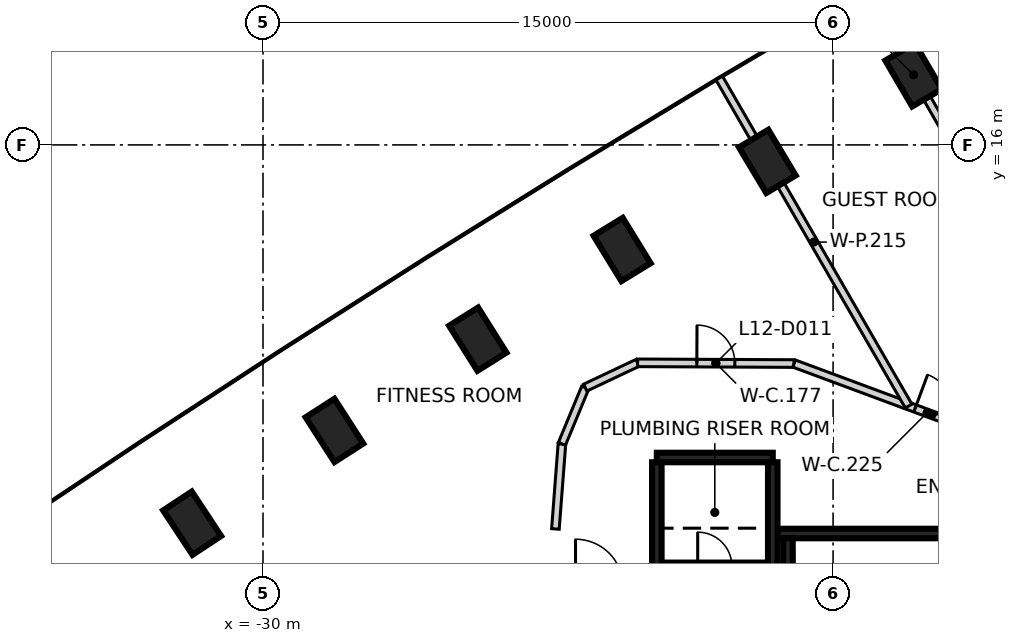
"""IFC4 building model, lengths in metres.
Left out: names, types, materials, properties, quantities, classifications, styles, units other than length and angle.
Written with IfcOpenShell. Run it as: python <this file> out.ifc"""

import sys

from ifc_helpers import new_model, si_unit, direction, frame, frame_2d, origin, origin_2d, place, context, subcontext, project, spatial, rectangle, extrude, element, fill, save


model = new_model("IFC4")
c1 = context("Model", 3, precision=1e-05, world=origin(), true_north=direction((0.0, 1.0)))
c2 = subcontext(c1, "Body", "Model", "MODEL_VIEW")
j1 = project(units=[si_unit("LENGTHUNIT", "METRE"), si_unit("PLANEANGLEUNIT", "RADIAN")], contexts=[c1])
p1 = place(None, origin())
s1 = spatial("IfcSite", under=j1, at=p1, CompositionType="ELEMENT")
p2 = place(p1, origin())
s2 = spatial("IfcBuilding", under=s1, at=p2, CompositionType="ELEMENT")
p3 = place(p2, frame((0.0, 0.0, 56.6)))
s3 = spatial("IfcBuildingStorey", under=s2, at=p3, CompositionType="ELEMENT", Elevation=56.6)
for number, where, z_axis, x_axis in (
    (1, (-12.883, 17.844, -0.475), (0.0, 0.0, 1.0), (-0.505, 0.863, 0.0)),
    (2, (-16.73, 15.566, -0.475), (0.0, 0.0, 1.0), (-0.514, 0.858, 0.0)),
    (3, (-20.552, 13.248, -0.475), (0.0, 0.0, 1.0), (-0.523, 0.852, 0.0)),
    (4, (-24.349, 10.888, -0.475), (0.0, 0.0, 1.0), (-0.532, 0.846, 0.0)),
    (5, (-28.12, 8.488, -0.475), (0.0, 0.0, 1.0), (-0.541, 0.841, 0.0)),
    (6, (-31.865, 6.046, -0.475), (0.0, 0.0, 1.0), (-0.551, 0.835, 0.0)),
):
    element("IfcColumn", number, at=place(p3, frame(where, z_axis=z_axis, x_axis=x_axis)), inside=s3, PredefinedType="COLUMN", context=c2, shape_type="SweptSolid", body=[
        extrude(rectangle(XDim=1.4, YDim=0.9, at=origin_2d()), origin(), (0.0, 0.0, 1.0), 3.6),
    ])
p4 = place(p3, frame((-16.472, 5.775, 0.0), z_axis=(0.0, 0.0, 1.0), x_axis=(1.0, 0.0, 0.0)))
e7 = element("IfcWall", 7, at=p4, inside=s3, PredefinedType="SHEAR", context=c2, shape_type="SweptSolid", body=[
    extrude(rectangle(XDim=5.51, YDim=0.25, at=frame_2d((2.755, 0.0))), origin(), (0.0, 0.0, 1.0), 3.125),
])
p5 = place(p3, frame((-19.637, 7.775, 0.0), z_axis=(0.0, 0.0, 1.0), x_axis=(1.0, 0.0, 0.0)))
e8 = element("IfcWall", 8, at=p5, inside=s3, PredefinedType="SHEAR", context=c2, shape_type="SweptSolid", body=[
    extrude(rectangle(XDim=3.05, YDim=0.25, at=frame_2d((1.525, 0.0))), origin(), (0.0, 0.0, 1.0), 3.125),
])
for number, where, z_axis, x_axis in (
    (9, (-16.587, 7.65, 0.0), (0.0, 0.0, 1.0), (0.0, -1.0, 0.0)),
    (10, (-19.637, 4.785, 0.0), (0.0, 0.0, 1.0), (0.0, 1.0, 0.0)),
):
    element("IfcWall", number, at=place(p3, frame(where, z_axis=z_axis, x_axis=x_axis)), inside=s3, PredefinedType="SHEAR", context=c2, shape_type="SweptSolid", body=[
        extrude(rectangle(XDim=2.865, YDim=0.25, at=frame_2d((1.432, 0.0))), origin(), (0.0, 0.0, 1.0), 3.125),
    ])
p6 = place(p3, frame((-16.187, 3.2, 0.0), z_axis=(0.0, 0.0, 1.0), x_axis=(0.0, 1.0, 0.0)))
e11 = element("IfcWall", 11, at=p6, inside=s3, PredefinedType="SHEAR", context=c2, shape_type="SweptSolid", body=[
    extrude(rectangle(XDim=2.449, YDim=0.25, at=frame_2d((1.225, 0.0))), origin(), (0.0, 0.0, 1.0), 3.125),
])
p7 = place(p3, frame((-22.306, 5.895, 0.0), z_axis=(0.0, 0.0, 1.0), x_axis=(0.076246699626, 0.997088983389, 0.0)))
e12 = element("IfcWall", 12, at=p7, inside=s3, PredefinedType="PARTITIONING", context=c2, shape_type="SweptSolid", body=[
    extrude(rectangle(XDim=2.241, YDim=0.2, at=frame_2d((1.121, 0.0))), origin(), (0.0, 0.0, 1.0), 3.125),
])
p8 = place(p3, frame((-22.135, 8.134, 0.0), z_axis=(0.0, 0.0, 1.0), x_axis=(0.383208453534, 0.923661886807, 0.0)))
e13 = element("IfcWall", 13, at=p8, inside=s3, PredefinedType="PARTITIONING", context=c2, shape_type="SweptSolid", body=[
    extrude(rectangle(XDim=1.602, YDim=0.2, at=frame_2d((0.801, 0.0))), origin(), (0.0, 0.0, 1.0), 3.125),
])
p9 = place(p3, frame((-21.521, 9.614, 0.0), z_axis=(0.0, 0.0, 1.0), x_axis=(0.904083527367, 0.427355795028, 0.0)))
e14 = element("IfcWall", 14, at=p9, inside=s3, PredefinedType="PARTITIONING", context=c2, shape_type="SweptSolid", body=[
    extrude(rectangle(XDim=1.523, YDim=0.2, at=frame_2d((0.761, 0.0))), origin(), (0.0, 0.0, 1.0), 3.125),
])
p10 = place(p3, frame((-20.143, 10.266, 0.0), z_axis=(0.0, 0.0, 1.0), x_axis=(0.999989297417, -0.004626559416, 0.0)))
e15 = element("IfcWall", 15, at=p10, inside=s3, PredefinedType="PARTITIONING", context=c2, shape_type="SweptSolid", body=[
    extrude(rectangle(XDim=4.116, YDim=0.2, at=frame_2d((2.058, 0.0))), origin(), (0.0, 0.0, 1.0), 3.125),
])
p11 = place(p10, frame((1.558, 0.0, 0.0)))
e16 = element("IfcOpeningElement", 16, at=p11, cuts=e15, PredefinedType="OPENING", context=c2, shape_type="SweptSolid", body=[
    extrude(rectangle(XDim=1.0, YDim=2.1, at=frame_2d((0.5, 1.05))), frame((0.0, 0.11, 0.0), z_axis=(0.0, -1.0, 0.0), x_axis=(1.0, 0.0, 0.0)), (0.0, 0.0, 1.0), 0.22),
])
p12 = place(p3, frame((-16.026, 10.247, 0.0), z_axis=(0.0, 0.0, 1.0), x_axis=(0.937540909117, -0.347875040397, 0.0)))
e17 = element("IfcWall", 17, at=p12, inside=s3, PredefinedType="PARTITIONING", context=c2, shape_type="SweptSolid", body=[
    extrude(rectangle(XDim=7.459, YDim=0.2, at=frame_2d((3.729, 0.0))), origin(), (0.0, 0.0, 1.0), 3.125),
])
p13 = place(p12, frame((3.396, 0.0, 0.0)))
e18 = element("IfcOpeningElement", 18, at=p13, cuts=e17, PredefinedType="OPENING", context=c2, shape_type="SweptSolid", body=[
    extrude(rectangle(XDim=0.95, YDim=2.1, at=frame_2d((0.475, 1.05))), frame((0.0, 0.11, 0.0), z_axis=(0.0, -1.0, 0.0), x_axis=(1.0, 0.0, 0.0)), (0.0, 0.0, 1.0), 0.22),
])
p14 = place(p3, frame((-17.996, 17.758, 0.0), z_axis=(0.0, 0.0, 1.0), x_axis=(0.500046945013, -0.865998298372, 0.0)))
e19 = element("IfcWall", 19, at=p14, inside=s3, PredefinedType="PARTITIONING", context=c2, shape_type="SweptSolid", body=[
    extrude(rectangle(XDim=9.964, YDim=0.2, at=frame_2d((4.982, 0.0))), origin(), (0.0, 0.0, 1.0), 3.125),
])
p15 = place(p3, frame((-14.149, 20.035, 0.0), z_axis=(0.0, 0.0, 1.0), x_axis=(0.500022967158, -0.866012143284, 0.0)))
e20 = element("IfcWall", 20, at=p15, inside=s3, PredefinedType="PARTITIONING", context=c2, shape_type="SweptSolid", body=[
    extrude(rectangle(XDim=11.838, YDim=0.2, at=frame_2d((5.919, 0.0))), origin(), (0.0, 0.0, 1.0), 3.125),
])
p16 = place(p13, origin())
e21 = element("IfcDoor", 21, at=p16, inside=s3, OperationType="SINGLE_SWING_LEFT", PredefinedType="DOOR", context=c2, shape_type="SweptSolid", body=[
    extrude(rectangle(XDim=0.95, YDim=2.1, at=frame_2d((0.475, 1.05))), frame((0.0, 0.025, 0.0), z_axis=(0.0, -1.0, 0.0), x_axis=(1.0, 0.0, 0.0)), (0.0, 0.0, 1.0), 0.05),
])
fill(e18, e21)
p17 = place(p11, origin())
e22 = element("IfcDoor", 22, at=p17, inside=s3, OperationType="SINGLE_SWING_LEFT", PredefinedType="DOOR", context=c2, shape_type="SweptSolid", body=[
    extrude(rectangle(XDim=1.0, YDim=2.1, at=frame_2d((0.5, 1.05))), frame((0.0, 0.025, 0.0), z_axis=(0.0, -1.0, 0.0), x_axis=(1.0, 0.0, 0.0)), (0.0, 0.0, 1.0), 0.05),
])
fill(e16, e22)
save(model, sys.argv[1])
